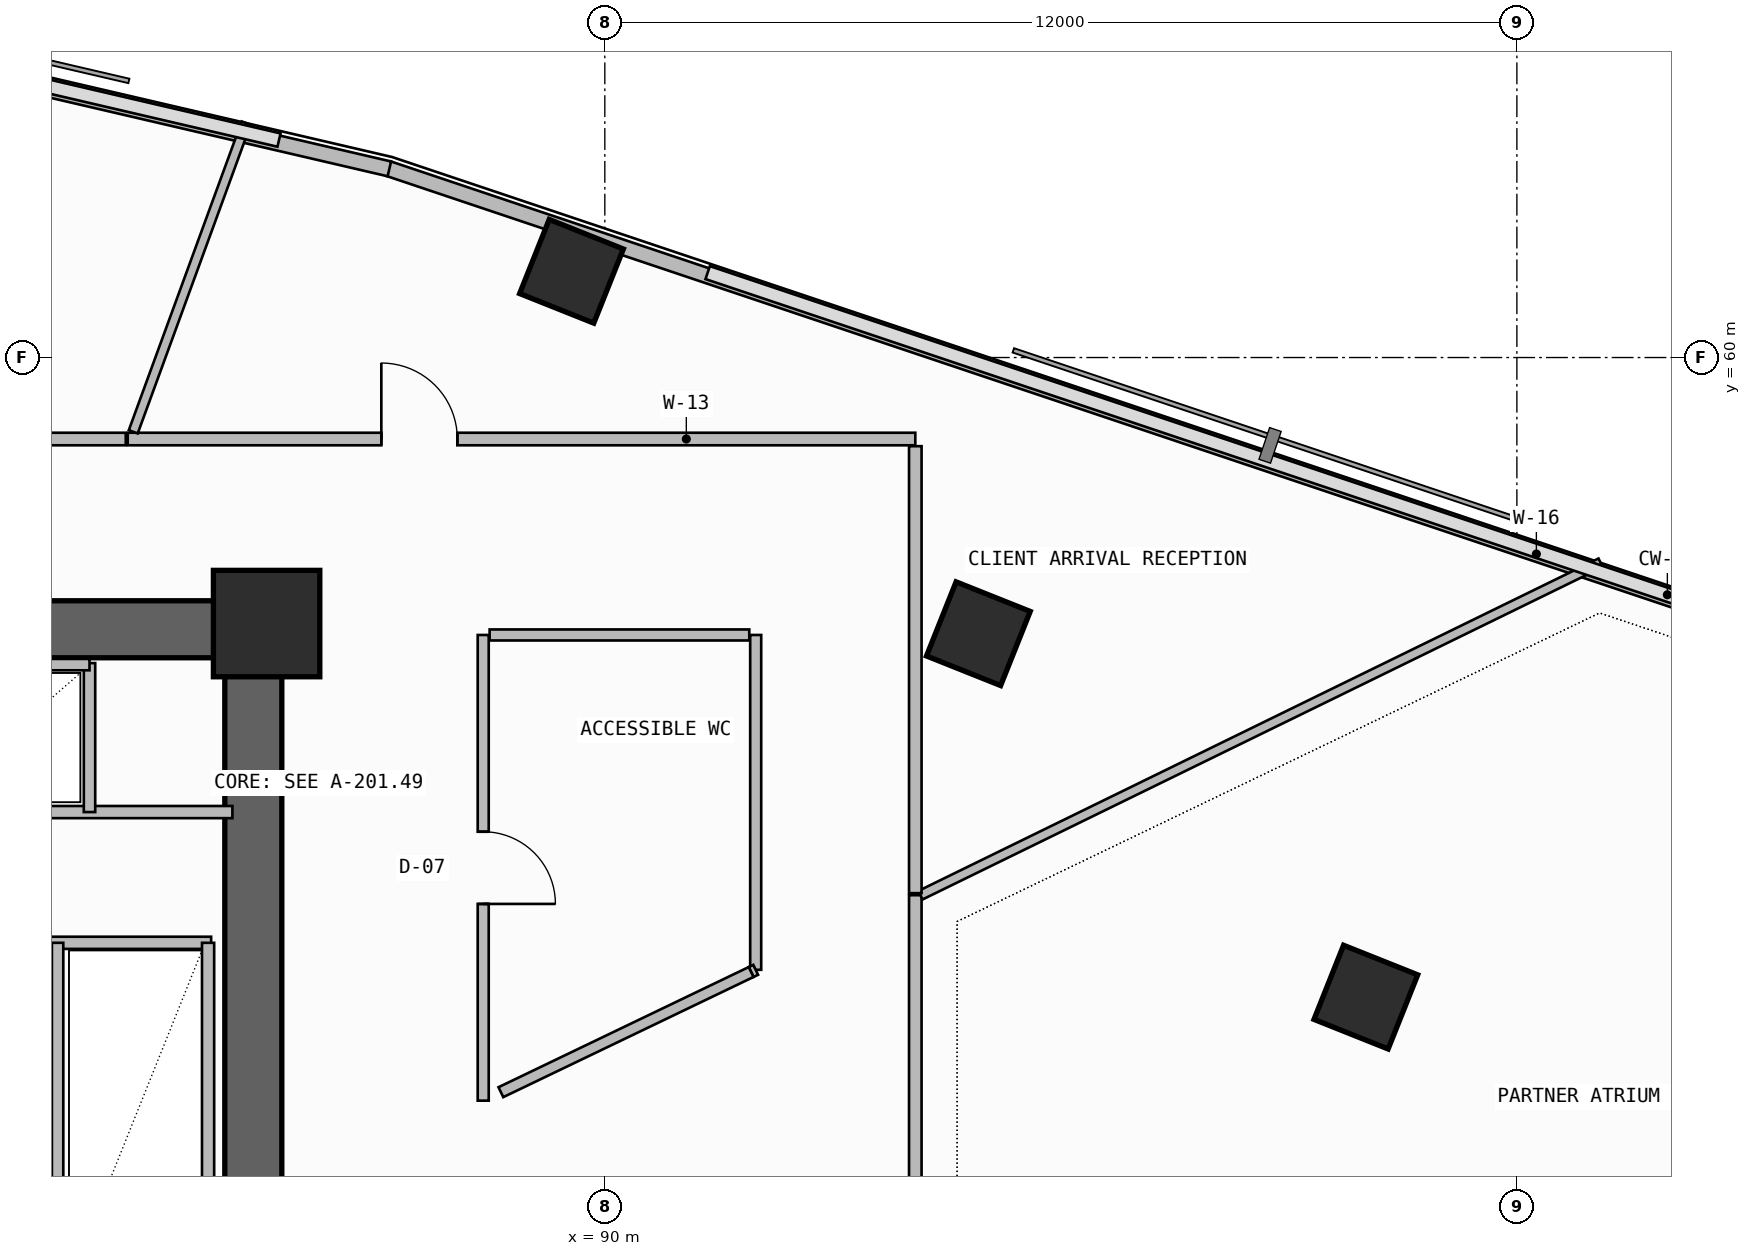
"""IFC4 building model, lengths in metres.
Left out: names, types, materials, properties, quantities, classifications, styles, units other than length and angle.
Written with IfcOpenShell. Run it as: python <this file> out.ifc"""

import sys

from ifc_helpers import new_model, si_unit, direction, frame, frame_2d, origin, origin_2d, place, context, subcontext, project, spatial, rectangle, extrude, element, fill, save


model = new_model("IFC4")
c1 = context("Model", 3, precision=1e-05, world=origin(), true_north=direction((0.0, 1.0)))
c2 = subcontext(c1, "Body", "Model", "MODEL_VIEW")
j1 = project(units=[si_unit("LENGTHUNIT", "METRE"), si_unit("PLANEANGLEUNIT", "RADIAN")], contexts=[c1])
p1 = place(None, origin())
s1 = spatial("IfcSite", under=j1, at=p1, CompositionType="ELEMENT")
p2 = place(p1, origin())
s2 = spatial("IfcBuilding", under=s1, at=p2, CompositionType="ELEMENT")
p3 = place(p2, frame((0.0, 0.0, 175.5)))
s3 = spatial("IfcBuildingStorey", under=s2, at=p3, CompositionType="ELEMENT", Elevation=175.5)
p4 = place(p3, frame((72.0, 56.425, -0.26), z_axis=(0.0, 0.0, 1.0), x_axis=(1.0, 0.0, 0.0)))
e1 = element("IfcWall", 1, at=p4, inside=s3, PredefinedType="SHEAR", context=c2, shape_type="SweptSolid", body=[
    extrude(rectangle(XDim=13.75, YDim=0.75, at=frame_2d((6.875, 0.0))), origin(), (0.0, 0.0, 1.0), 3.6),
])
p5 = place(p3, frame((85.375, 47.6, -0.26), z_axis=(0.0, 0.0, 1.0), x_axis=(0.0, 1.0, 0.0)))
e2 = element("IfcWall", 2, at=p5, inside=s3, PredefinedType="SHEAR", context=c2, shape_type="SweptSolid", body=[
    extrude(rectangle(XDim=8.45, YDim=0.75, at=frame_2d((4.225, 0.0))), origin(), (0.0, 0.0, 1.0), 3.6),
])
p6 = place(p3, frame((85.55, 56.5, 0.0), z_axis=(0.0, 0.0, 1.0), x_axis=(1.0, 0.0, 0.0)))
e3 = element("IfcColumn", 3, at=p6, inside=s3, PredefinedType="COLUMN", context=c2, shape_type="SweptSolid", body=[
    extrude(rectangle(XDim=1.4, YDim=1.4, at=origin_2d()), origin(), (0.0, 0.0, 1.0), 3.6),
])
for number, where, z_axis, x_axis in (
    (4, (100.013, 51.585, 0.0), (0.0, 0.0, 1.0), (0.371, 0.929, 0.0)),
    (5, (94.915, 56.367, 0.0), (0.0, 0.0, 1.0), (0.371, 0.929, 0.0)),
    (6, (89.562, 61.135, 0.0), (0.0, 0.0, 1.0), (0.371, 0.929, 0.0)),
):
    element("IfcColumn", number, at=place(p3, frame(where, z_axis=z_axis, x_axis=x_axis)), inside=s3, PredefinedType="COLUMN", context=c2, shape_type="SweptSolid", body=[
        extrude(rectangle(XDim=1.05, YDim=1.05, at=origin_2d()), origin(), (0.0, 0.0, 1.0), 3.6),
    ])
p7 = place(p3, frame((117.363, 52.344, 0.0), z_axis=(0.0, 0.0, 1.0), x_axis=(-0.94800468727, 0.31825636351, 0.0)))
e7 = element("IfcWall", 7, at=p7, inside=s3, PredefinedType="PARAPET", context=c2, shape_type="SweptSolid", body=[
    extrude(rectangle(XDim=31.869, YDim=0.2, at=frame_2d((15.935, 0.0))), origin(), (0.0, 0.0, 1.0), 1.15),
])
p8 = place(p3, frame((87.165, 62.482, 0.0), z_axis=(0.0, 0.0, 1.0), x_axis=(-0.973958631559, 0.226725790352, 0.0)))
e8 = element("IfcWall", 8, at=p8, inside=s3, PredefinedType="PARAPET", context=c2, shape_type="SweptSolid", body=[
    extrude(rectangle(XDim=27.376, YDim=0.2, at=frame_2d((13.688, 0.0))), origin(), (0.0, 0.0, 1.0), 1.15),
])
p9 = place(p3, frame((80.6, 52.3, 0.0), z_axis=(0.0, 0.0, 1.0), x_axis=(1.0, 0.0, 0.0)))
e9 = element("IfcWall", 9, at=p9, inside=s3, PredefinedType="SOLIDWALL", context=c2, shape_type="SweptSolid", body=[
    extrude(rectangle(XDim=4.22, YDim=0.16, at=frame_2d((2.11, 0.0))), origin(), (0.0, 0.0, 1.0), 3.34),
])
for number, where, z_axis, x_axis in (
    (10, (80.6, 49.26, 0.0), (0.0, 0.0, 1.0), (1.0, 0.0, 0.0)),
    (11, (80.6, 50.78, 0.0), (0.0, 0.0, 1.0), (1.0, 0.0, 0.0)),
):
    element("IfcWall", number, at=place(p3, frame(where, z_axis=z_axis, x_axis=x_axis)), inside=s3, PredefinedType="PLUMBINGWALL", context=c2, shape_type="SweptSolid", body=[
        extrude(rectangle(XDim=2.2, YDim=0.15, at=frame_2d((1.1, 0.0))), origin(), (0.0, 0.0, 1.0), 3.34),
    ])
p10 = place(p3, frame((82.8, 47.7, 0.0), z_axis=(0.0, 0.0, 1.0), x_axis=(0.0, 1.0, 0.0)))
e12 = element("IfcWall", 12, at=p10, inside=s3, PredefinedType="PLUMBINGWALL", context=c2, shape_type="SweptSolid", body=[
    extrude(rectangle(XDim=4.6, YDim=0.15, at=frame_2d((2.3, 0.0))), origin(), (0.0, 0.0, 1.0), 3.34),
])
p11 = place(p3, frame((84.78, 47.7, 0.0), z_axis=(0.0, 0.0, 1.0), x_axis=(0.0, 1.0, 0.0)))
e13 = element("IfcWall", 13, at=p11, inside=s3, PredefinedType="SOLIDWALL", context=c2, shape_type="SweptSolid", body=[
    extrude(rectangle(XDim=4.6, YDim=0.16, at=frame_2d((2.3, 0.0))), origin(), (0.0, 0.0, 1.0), 3.34),
])
p12 = place(p3, frame((73.02, 54.02, 0.0), z_axis=(0.0, 0.0, 1.0), x_axis=(1.0, 0.0, 0.0)))
e14 = element("IfcWall", 14, at=p12, inside=s3, PredefinedType="SOLIDWALL", context=c2, shape_type="SweptSolid", body=[
    extrude(rectangle(XDim=12.08, YDim=0.16, at=frame_2d((6.04, 0.0))), origin(), (0.0, 0.0, 1.0), 3.34),
])
p13 = place(p3, frame((83.22, 54.02, 0.0), z_axis=(0.0, 0.0, 1.0), x_axis=(0.0, 1.0, 0.0)))
e15 = element("IfcWall", 15, at=p13, inside=s3, PredefinedType="SOLIDWALL", context=c2, shape_type="SweptSolid", body=[
    extrude(rectangle(XDim=1.96, YDim=0.15, at=frame_2d((0.98, 0.0))), origin(), (0.0, 0.0, 1.0), 3.34),
])
p14 = place(p3, frame((76.52, 55.96, 0.0), z_axis=(0.0, 0.0, 1.0), x_axis=(1.0, 0.0, 0.0)))
e16 = element("IfcWall", 16, at=p14, inside=s3, PredefinedType="SOLIDWALL", context=c2, shape_type="SweptSolid", body=[
    extrude(rectangle(XDim=6.7, YDim=0.15, at=frame_2d((3.35, 0.0))), origin(), (0.0, 0.0, 1.0), 3.34),
])
p15 = place(p3, frame((94.085, 43.714, 0.0), z_axis=(0.0, 0.0, 1.0), x_axis=(0.0, 1.0, 0.0)))
e17 = element("IfcWall", 17, at=p15, inside=s3, PredefinedType="PARTITIONING", context=c2, shape_type="SweptSolid", body=[
    extrude(rectangle(XDim=9.212, YDim=0.165, at=frame_2d((4.606, 0.0))), origin(), (0.0, 0.0, 1.0), 2.825),
])
p16 = place(p15, frame((4.106, 0.0, 0.0)))
e18 = element("IfcOpeningElement", 18, at=p16, cuts=e17, PredefinedType="OPENING", context=c2, shape_type="SweptSolid", body=[
    extrude(rectangle(XDim=1.0, YDim=2.2, at=frame_2d((0.5, 1.1))), frame((0.0, 0.093, 0.0), z_axis=(0.0, -1.0, 0.0), x_axis=(1.0, 0.0, 0.0)), (0.0, 0.0, 1.0), 0.185),
])
p17 = place(p3, frame((94.153, 52.927, 0.0), z_axis=(0.0, 0.0, 1.0), x_axis=(0.898440022674, 0.439096260127, 0.0)))
e19 = element("IfcWall", 19, at=p17, inside=s3, PredefinedType="PARTITIONING", context=c2, shape_type="SweptSolid", body=[
    extrude(rectangle(XDim=9.96, YDim=0.125, at=frame_2d((4.98, 0.0))), origin(), (0.0, 0.0, 1.0), 2.725),
])
p18 = place(p3, frame((88.4, 50.223, 0.0), z_axis=(0.0, 0.0, 1.0), x_axis=(0.0, 1.0, 0.0)))
e20 = element("IfcWall", 20, at=p18, inside=s3, PredefinedType="PARTITIONING", context=c2, shape_type="SweptSolid", body=[
    extrude(rectangle(XDim=6.127, YDim=0.145, at=frame_2d((3.063, 0.0))), origin(), (0.0, 0.0, 1.0), 2.825),
])
p19 = place(p18, frame((2.588, 0.0, 0.0)))
e21 = element("IfcOpeningElement", 21, at=p19, cuts=e20, PredefinedType="OPENING", context=c2, shape_type="SweptSolid", body=[
    extrude(rectangle(XDim=0.95, YDim=2.15, at=frame_2d((0.475, 1.075))), frame((0.0, 0.083, 0.0), z_axis=(0.0, -1.0, 0.0), x_axis=(1.0, 0.0, 0.0)), (0.0, 0.0, 1.0), 0.165),
])
p20 = place(p3, frame((91.985, 56.35, 0.0), z_axis=(0.0, 0.0, 1.0), x_axis=(0.0, -1.0, 0.0)))
e22 = element("IfcWall", 22, at=p20, inside=s3, PredefinedType="PARTITIONING", context=c2, shape_type="SweptSolid", body=[
    extrude(rectangle(XDim=4.406, YDim=0.145, at=frame_2d((2.203, 0.0))), origin(), (0.0, 0.0, 1.0), 2.825),
])
p21 = place(p3, frame((88.485, 56.35, 0.0), z_axis=(0.0, 0.0, 1.0), x_axis=(1.0, 0.0, 0.0)))
e23 = element("IfcWall", 23, at=p21, inside=s3, PredefinedType="PARTITIONING", context=c2, shape_type="SweptSolid", body=[
    extrude(rectangle(XDim=3.416, YDim=0.145, at=frame_2d((1.708, 0.0))), origin(), (0.0, 0.0, 1.0), 2.825),
])
p22 = place(p3, frame((91.985, 51.945, 0.0), z_axis=(0.0, 0.0, 1.0), x_axis=(-0.901637414301, -0.432492743445, 0.0)))
e24 = element("IfcWall", 24, at=p22, inside=s3, PredefinedType="PARTITIONING", context=c2, shape_type="SweptSolid", body=[
    extrude(rectangle(XDim=0.067, YDim=0.145, at=frame_2d((0.033, 0.0))), origin(), (0.0, 0.0, 1.0), 3.34),
])
p23 = place(p3, frame((94.085, 58.928, 0.0), z_axis=(0.0, 0.0, 1.0), x_axis=(-1.0, 0.0, 0.0)))
e25 = element("IfcWall", 25, at=p23, inside=s3, PredefinedType="PARTITIONING", context=c2, shape_type="SweptSolid", body=[
    extrude(rectangle(XDim=10.363, YDim=0.165, at=frame_2d((5.181, 0.0))), origin(), (0.0, 0.0, 1.0), 2.725),
])
p24 = place(p23, frame((6.026, 0.0, 0.0)))
e26 = element("IfcOpeningElement", 26, at=p24, cuts=e25, PredefinedType="OPENING", context=c2, shape_type="SweptSolid", body=[
    extrude(rectangle(XDim=1.0, YDim=2.2, at=frame_2d((0.5, 1.1))), frame((0.0, 0.093, 0.0), z_axis=(0.0, -1.0, 0.0), x_axis=(1.0, 0.0, 0.0)), (0.0, 0.0, 1.0), 0.185),
])
p25 = place(p3, frame((94.085, 52.953, 0.0), z_axis=(0.0, 0.0, 1.0), x_axis=(0.0, 1.0, 0.0)))
e27 = element("IfcWall", 27, at=p25, inside=s3, PredefinedType="PARTITIONING", context=c2, shape_type="SweptSolid", body=[
    extrude(rectangle(XDim=5.88, YDim=0.165, at=frame_2d((2.94, 0.0))), origin(), (0.0, 0.0, 1.0), 2.725),
])
p26 = place(p3, frame((83.795, 59.022, 0.0), z_axis=(0.0, 0.0, 1.0), x_axis=(0.343460112178, 0.939167264838, 0.0)))
e28 = element("IfcWall", 28, at=p26, inside=s3, PredefinedType="PARTITIONING", context=c2, shape_type="SweptSolid", body=[
    extrude(rectangle(XDim=4.325, YDim=0.125, at=frame_2d((2.163, 0.0))), origin(), (0.0, 0.0, 1.0), 3.34),
])
p27 = place(p3, frame((83.697, 58.928, 0.0), z_axis=(0.0, 0.0, 1.0), x_axis=(-1.0, 0.0, 0.0)))
e29 = element("IfcWall", 29, at=p27, inside=s3, PredefinedType="PARTITIONING", context=c2, shape_type="SweptSolid", body=[
    extrude(rectangle(XDim=6.029, YDim=0.165, at=frame_2d((3.014, 0.0))), origin(), (0.0, 0.0, 1.0), 3.34),
])
p28 = place(p27, frame((2.514, 0.0, 0.0)))
e30 = element("IfcOpeningElement", 30, at=p28, cuts=e29, PredefinedType="OPENING", context=c2, shape_type="SweptSolid", body=[
    extrude(rectangle(XDim=1.0, YDim=2.2, at=frame_2d((0.5, 1.1))), frame((0.0, 0.093, 0.0), z_axis=(0.0, -1.0, 0.0), x_axis=(1.0, 0.0, 0.0)), (0.0, 0.0, 1.0), 0.185),
])
p29 = place(p3, frame((91.925, 51.916, 0.0), z_axis=(0.0, 0.0, 1.0), x_axis=(-0.901452116441, -0.432878830348, 0.0)))
e31 = element("IfcWall", 31, at=p29, inside=s3, PredefinedType="PARTITIONING", context=c2, shape_type="SweptSolid", body=[
    extrude(rectangle(XDim=3.652, YDim=0.145, at=frame_2d((1.826, 0.0))), origin(), (0.0, 0.0, 1.0), 2.925),
])
p30 = place(p19, frame((0.95, 0.0, 0.0), z_axis=(0.0, 0.0, 1.0), x_axis=(-1.0, 0.0, 0.0)))
e32 = element("IfcDoor", 32, at=p30, inside=s3, OperationType="SINGLE_SWING_RIGHT", PredefinedType="DOOR", context=c2, shape_type="SweptSolid", body=[
    extrude(rectangle(XDim=0.95, YDim=2.15, at=frame_2d((0.475, 1.075))), frame((0.0, 0.025, 0.0), z_axis=(0.0, -1.0, 0.0), x_axis=(1.0, 0.0, 0.0)), (0.0, 0.0, 1.0), 0.05),
])
fill(e21, e32)
p31 = place(p24, frame((1.0, 0.0, 0.0), z_axis=(0.0, 0.0, 1.0), x_axis=(-1.0, 0.0, 0.0)))
e33 = element("IfcDoor", 33, at=p31, inside=s3, OperationType="SINGLE_SWING_LEFT", PredefinedType="DOOR", context=c2, shape_type="SweptSolid", body=[
    extrude(rectangle(XDim=1.0, YDim=2.2, at=frame_2d((0.5, 1.1))), frame((0.0, 0.025, 0.0), z_axis=(0.0, -1.0, 0.0), x_axis=(1.0, 0.0, 0.0)), (0.0, 0.0, 1.0), 0.05),
])
fill(e26, e33)
save(model, sys.argv[1])
